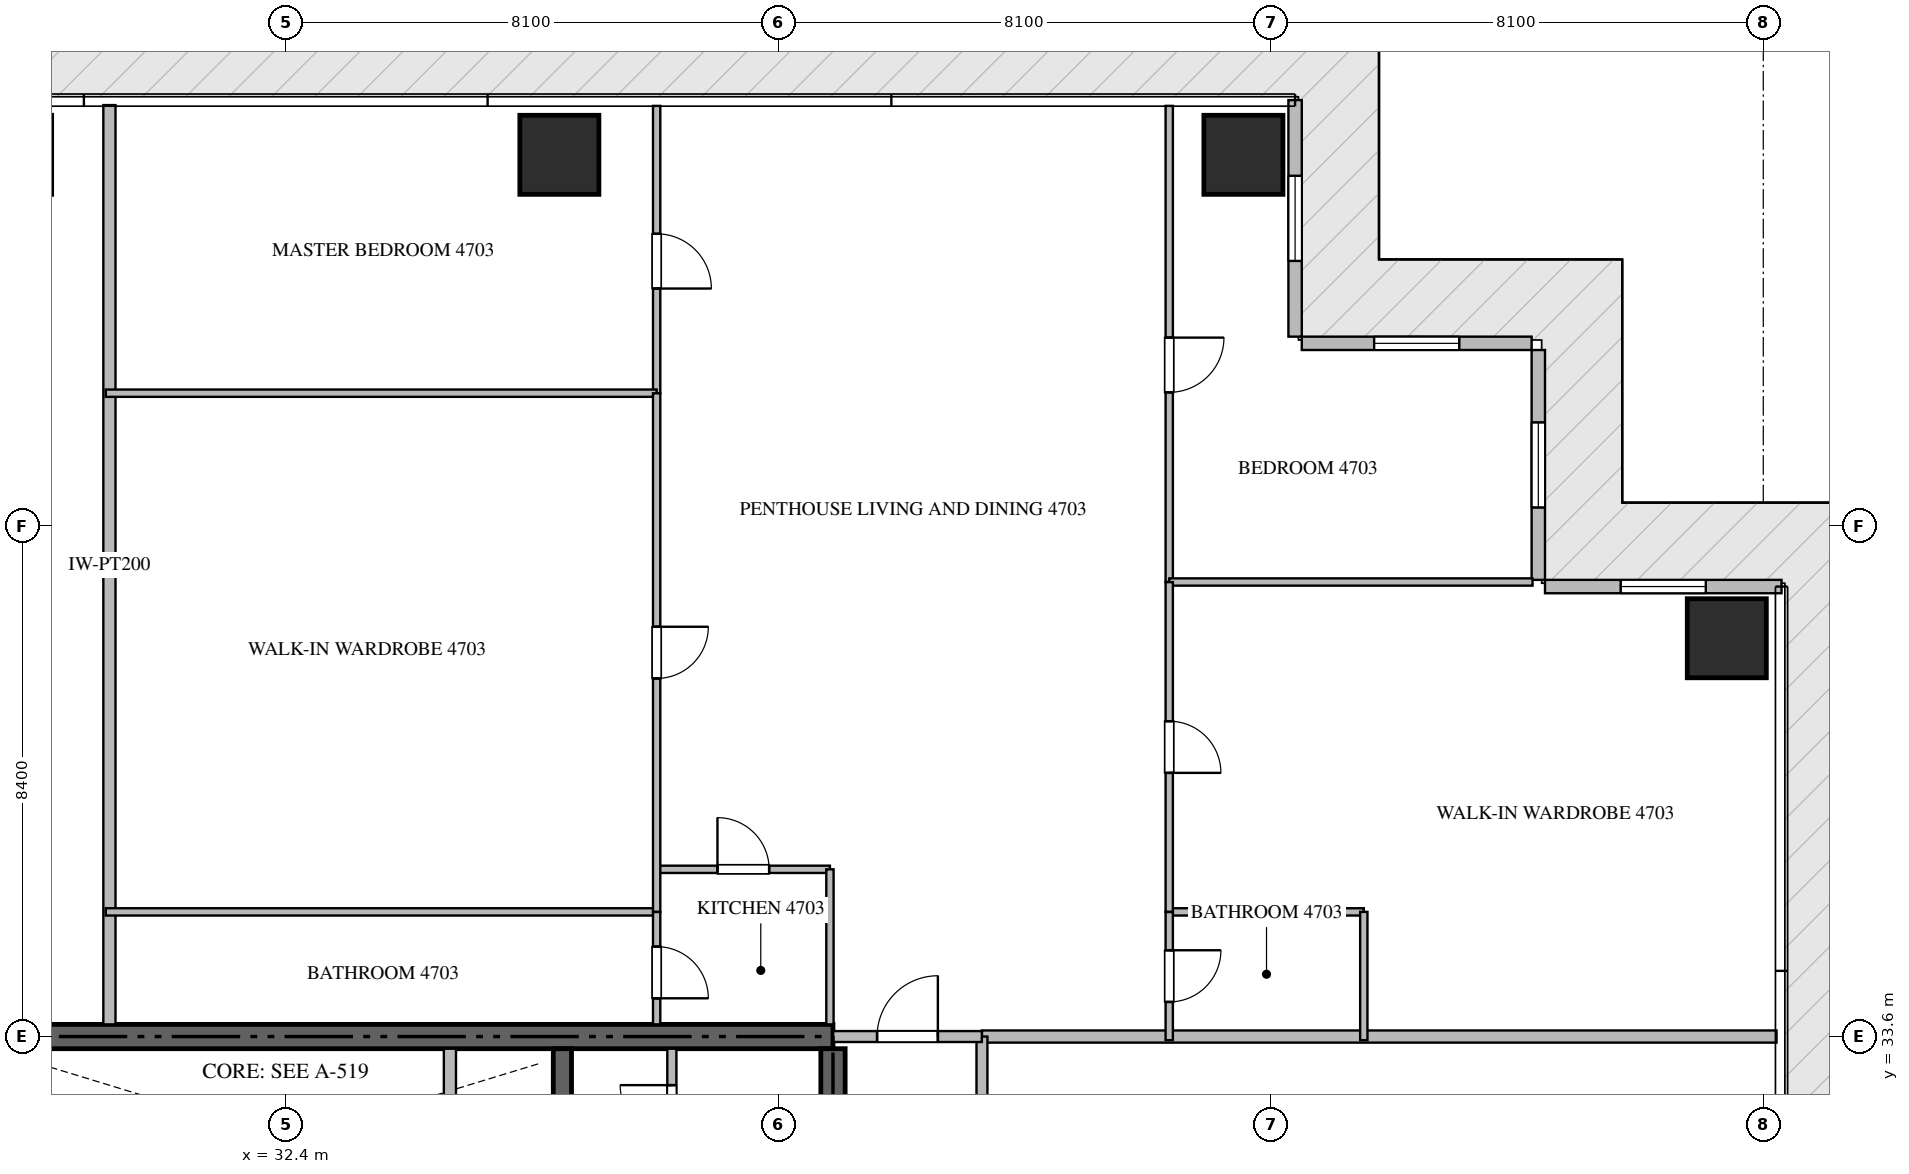
"""IFC4 building model, lengths in metres.
Left out: names, types, materials, properties, quantities, classifications, styles, units other than length and angle.
Written with IfcOpenShell. Run it as: python <this file> out.ifc"""

import sys

from ifc_helpers import new_model, si_unit, direction, frame, frame_2d, origin, origin_2d, place, context, subcontext, project, spatial, rectangle, extrude, source, transform, mapped, element, fill, save


model = new_model("IFC4")
c1 = context("Model", 3, precision=1e-05, world=origin(), true_north=direction((0.0, 1.0)))
c2 = subcontext(c1, "Body", "Model", "MODEL_VIEW")
j1 = project(units=[si_unit("LENGTHUNIT", "METRE"), si_unit("PLANEANGLEUNIT", "RADIAN")], contexts=[c1])
p1 = place(None, origin())
s1 = spatial("IfcSite", under=j1, at=p1, CompositionType="ELEMENT")
p2 = place(p1, origin())
s2 = spatial("IfcBuilding", under=s1, at=p2, CompositionType="ELEMENT")
p3 = place(p2, frame((0.0, 0.0, 187.65)))
s3 = spatial("IfcBuildingStorey", under=s2, at=p3, CompositionType="ELEMENT", Elevation=187.65)
p4 = place(p3, frame((41.4, 33.6, -0.26), z_axis=(0.0, 0.0, 1.0), x_axis=(-1.0, 0.0, 0.0)))
e1 = element("IfcWall", 1, at=p4, inside=s3, PredefinedType="SHEAR", context=c2, shape_type="SweptSolid", body=[
    extrude(rectangle(XDim=18.0, YDim=0.4, at=frame_2d((9.0, 0.0))), origin(), (0.0, 0.0, 1.0), 3.748),
])
p5 = place(p3, frame((41.4, 27.75, -0.26), z_axis=(0.0, 0.0, 1.0), x_axis=(0.0, 1.0, 0.0)))
e2 = element("IfcWall", 2, at=p5, inside=s3, PredefinedType="SHEAR", context=c2, shape_type="SweptSolid", body=[
    extrude(rectangle(XDim=5.65, YDim=0.4, at=frame_2d((2.825, 0.0))), origin(), (0.0, 0.0, 1.0), 3.748),
])
p6 = place(p3, frame((36.95, 27.05, -0.26), z_axis=(0.0, 0.0, 1.0), x_axis=(0.0, 1.0, 0.0)))
e3 = element("IfcWall", 3, at=p6, inside=s3, PredefinedType="SHEAR", context=c2, shape_type="SweptSolid", body=[
    extrude(rectangle(XDim=6.35, YDim=0.3, at=frame_2d((3.175, 0.0))), origin(), (0.0, 0.0, 1.0), 3.748),
])
m1 = source(origin(), c2, "Body", "SweptSolid", [
    extrude(rectangle(XDim=1.3, YDim=1.3, at=origin_2d()), origin(), (0.0, 0.0, 1.0), 3.75),
])
for number, where, z_axis, x_axis in (
    (4, (36.9, 48.1, -0.26), (0.0, 0.0, 1.0), (1.0, 0.0, 0.0)),
    (5, (48.15, 48.1, -0.26), (0.0, 0.0, 1.0), (1.0, 0.0, 0.0)),
    (6, (56.1, 40.15, -0.26), (0.0, 0.0, 1.0), (1.0, 0.0, 0.0)),
):
    element("IfcColumn", number, at=place(p3, frame(where, z_axis=z_axis, x_axis=x_axis)), inside=s3, PredefinedType="COLUMN", context=c2, shape_type="MappedRepresentation", body=[
        mapped(m1, transform((0.0, 0.0, 0.0), scale=1.0)),
    ])
p7 = place(p3, frame((57.0, 41.0, 0.0), z_axis=(0.0, 0.0, 1.0), x_axis=(-1.0, 0.0, 0.0)))
e7 = element("IfcWall", 7, at=p7, inside=s3, PredefinedType="ELEMENTEDWALL", context=c2, shape_type="SweptSolid", body=[
    extrude(rectangle(XDim=3.89, YDim=0.22, at=frame_2d((1.945, 0.0))), origin(), (0.0, 0.0, 1.0), 3.475),
])
p8 = place(p7, frame((1.245, 0.0, 0.65)))
e8 = element("IfcOpeningElement", 8, at=p8, cuts=e7, PredefinedType="OPENING", context=c2, shape_type="SweptSolid", body=[
    extrude(rectangle(XDim=1.4, YDim=2.05, at=frame_2d((0.7, 1.025))), frame((0.0, 0.12, 0.0), z_axis=(0.0, -1.0, 0.0), x_axis=(1.0, 0.0, 0.0)), (0.0, 0.0, 1.0), 0.24),
])
p9 = place(p3, frame((53.0, 41.11, 0.0), z_axis=(0.0, 0.0, 1.0), x_axis=(0.0, 1.0, 0.0)))
e9 = element("IfcWall", 9, at=p9, inside=s3, PredefinedType="ELEMENTEDWALL", context=c2, shape_type="SweptSolid", body=[
    extrude(rectangle(XDim=3.78, YDim=0.22, at=frame_2d((1.89, 0.0))), origin(), (0.0, 0.0, 1.0), 3.475),
])
p10 = place(p9, frame((1.19, 0.0, 0.65)))
e10 = element("IfcOpeningElement", 10, at=p10, cuts=e9, PredefinedType="OPENING", context=c2, shape_type="SweptSolid", body=[
    extrude(rectangle(XDim=1.4, YDim=2.05, at=frame_2d((0.7, 1.025))), frame((0.0, 0.12, 0.0), z_axis=(0.0, -1.0, 0.0), x_axis=(1.0, 0.0, 0.0)), (0.0, 0.0, 1.0), 0.24),
])
p11 = place(p3, frame((52.89, 45.0, 0.0), z_axis=(0.0, 0.0, 1.0), x_axis=(-1.0, 0.0, 0.0)))
e11 = element("IfcWall", 11, at=p11, inside=s3, PredefinedType="ELEMENTEDWALL", context=c2, shape_type="SweptSolid", body=[
    extrude(rectangle(XDim=3.78, YDim=0.22, at=frame_2d((1.89, 0.0))), origin(), (0.0, 0.0, 1.0), 3.475),
])
p12 = place(p11, frame((1.19, 0.0, 0.65)))
e12 = element("IfcOpeningElement", 12, at=p12, cuts=e11, PredefinedType="OPENING", context=c2, shape_type="SweptSolid", body=[
    extrude(rectangle(XDim=1.4, YDim=2.05, at=frame_2d((0.7, 1.025))), frame((0.0, 0.12, 0.0), z_axis=(0.0, -1.0, 0.0), x_axis=(1.0, 0.0, 0.0)), (0.0, 0.0, 1.0), 0.24),
])
p13 = place(p3, frame((49.0, 45.11, 0.0), z_axis=(0.0, 0.0, 1.0), x_axis=(0.0, 1.0, 0.0)))
e13 = element("IfcWall", 13, at=p13, inside=s3, PredefinedType="ELEMENTEDWALL", context=c2, shape_type="SweptSolid", body=[
    extrude(rectangle(XDim=3.89, YDim=0.22, at=frame_2d((1.945, 0.0))), origin(), (0.0, 0.0, 1.0), 3.475),
])
p14 = place(p13, frame((1.245, 0.0, 0.65)))
e14 = element("IfcOpeningElement", 14, at=p14, cuts=e13, PredefinedType="OPENING", context=c2, shape_type="SweptSolid", body=[
    extrude(rectangle(XDim=1.4, YDim=2.05, at=frame_2d((0.7, 1.025))), frame((0.0, 0.12, 0.0), z_axis=(0.0, -1.0, 0.0), x_axis=(1.0, 0.0, 0.0)), (0.0, 0.0, 1.0), 0.24),
])
p15 = place(p3, frame((35.1, 30.75, 0.0), z_axis=(0.0, 0.0, 1.0), x_axis=(0.0, 1.0, 0.0)))
e15 = element("IfcWall", 15, at=p15, inside=s3, PredefinedType="STANDARD", context=c2, shape_type="SweptSolid", body=[
    extrude(rectangle(XDim=2.65, YDim=0.2, at=frame_2d((1.325, 0.0))), origin(), (0.0, 0.0, 1.0), 3.49),
])
p16 = place(p3, frame((38.75, 31.352, 0.0), z_axis=(0.0, 0.0, 1.0), x_axis=(0.0, 1.0, 0.0)))
e16 = element("IfcWall", 16, at=p16, inside=s3, PredefinedType="PARTITIONING", context=c2, shape_type="SweptSolid", body=[
    extrude(rectangle(XDim=2.048, YDim=0.15, at=frame_2d((1.024, 0.0))), origin(), (0.0, 0.0, 1.0), 3.49),
])
p17 = place(p16, frame((0.599, 0.0, 0.0)))
e17 = element("IfcOpeningElement", 17, at=p17, cuts=e16, PredefinedType="OPENING", context=c2, shape_type="SweptSolid", body=[
    extrude(rectangle(XDim=0.85, YDim=2.1, at=frame_2d((0.425, 1.05))), frame((0.0, 0.085, 0.0), z_axis=(0.0, -1.0, 0.0), x_axis=(1.0, 0.0, 0.0)), (0.0, 0.0, 1.0), 0.17),
])
p18 = place(p3, frame((29.5, 33.8, 0.0), z_axis=(0.0, 0.0, 1.0), x_axis=(0.0, 1.0, 0.0)))
e18 = element("IfcWall", 18, at=p18, inside=s3, PredefinedType="PARTITIONING", context=c2, shape_type="SweptSolid", body=[
    extrude(rectangle(XDim=15.118, YDim=0.2, at=frame_2d((7.559, 0.0))), origin(), (0.0, 0.0, 1.0), 3.49),
])
p19 = place(p3, frame((43.85, 33.6, 0.0), z_axis=(0.0, 0.0, 1.0), x_axis=(1.0, 0.0, 0.0)))
e19 = element("IfcWall", 19, at=p19, inside=s3, PredefinedType="PARTITIONING", context=c2, shape_type="SweptSolid", body=[
    extrude(rectangle(XDim=13.068, YDim=0.2, at=frame_2d((6.534, 0.0))), origin(), (0.0, 0.0, 1.0), 3.49),
])
p20 = place(p3, frame((43.85, 14.9, 0.0), z_axis=(0.0, 0.0, 1.0), x_axis=(0.0, 1.0, 0.0)))
e20 = element("IfcWall", 20, at=p20, inside=s3, PredefinedType="PARTITIONING", context=c2, shape_type="SweptSolid", body=[
    extrude(rectangle(XDim=18.7, YDim=0.18, at=frame_2d((9.35, 0.0))), origin(), (0.0, 0.0, 1.0), 3.49),
])
p21 = place(p20, frame((6.708, 0.0, 0.0)))
e21 = element("IfcOpeningElement", 21, at=p21, cuts=e20, PredefinedType="OPENING", context=c2, shape_type="SweptSolid", body=[
    extrude(rectangle(XDim=1.0, YDim=2.15, at=frame_2d((0.5, 1.075))), frame((0.0, 0.1, 0.0), z_axis=(0.0, -1.0, 0.0), x_axis=(1.0, 0.0, 0.0)), (0.0, 0.0, 1.0), 0.2),
])
p22 = place(p20, frame((15.134, 0.0, 0.0)))
e22 = element("IfcOpeningElement", 22, at=p22, cuts=e20, PredefinedType="OPENING", context=c2, shape_type="SweptSolid", body=[
    extrude(rectangle(XDim=1.0, YDim=2.15, at=frame_2d((0.5, 1.075))), frame((0.0, 0.1, 0.0), z_axis=(0.0, -1.0, 0.0), x_axis=(1.0, 0.0, 0.0)), (0.0, 0.0, 1.0), 0.2),
])
p23 = place(p3, frame((41.402, 33.6, 0.0), z_axis=(0.0, 0.0, 1.0), x_axis=(1.0, 0.0, 0.0)))
e23 = element("IfcWall", 23, at=p23, inside=s3, PredefinedType="PARTITIONING", context=c2, shape_type="SweptSolid", body=[
    extrude(rectangle(XDim=2.446, YDim=0.18, at=frame_2d((1.223, 0.0))), origin(), (0.0, 0.0, 1.0), 3.49),
])
p24 = place(p23, frame((0.723, 0.0, 0.0)))
e24 = element("IfcOpeningElement", 24, at=p24, cuts=e23, PredefinedType="OPENING", context=c2, shape_type="SweptSolid", body=[
    extrude(rectangle(XDim=1.0, YDim=2.15, at=frame_2d((0.5, 1.075))), frame((0.0, 0.1, 0.0), z_axis=(0.0, -1.0, 0.0), x_axis=(1.0, 0.0, 0.0)), (0.0, 0.0, 1.0), 0.2),
])
p25 = place(p3, frame((38.5, 36.35, 0.0), z_axis=(0.0, 0.0, 1.0), x_axis=(1.0, 0.0, 0.0)))
e25 = element("IfcWall", 25, at=p25, inside=s3, PredefinedType="PARTITIONING", context=c2, shape_type="SweptSolid", body=[
    extrude(rectangle(XDim=2.85, YDim=0.12, at=frame_2d((1.425, 0.0))), origin(), (0.0, 0.0, 1.0), 3.49),
])
p26 = place(p25, frame((1.0, 0.0, 0.0)))
e26 = element("IfcOpeningElement", 26, at=p26, cuts=e25, PredefinedType="OPENING", context=c2, shape_type="SweptSolid", body=[
    extrude(rectangle(XDim=0.85, YDim=2.1, at=frame_2d((0.425, 1.05))), frame((0.0, 0.07, 0.0), z_axis=(0.0, -1.0, 0.0), x_axis=(1.0, 0.0, 0.0)), (0.0, 0.0, 1.0), 0.14),
])
p27 = place(p3, frame((41.35, 36.35, 0.0), z_axis=(0.0, 0.0, 1.0), x_axis=(0.0, -1.0, 0.0)))
e27 = element("IfcWall", 27, at=p27, inside=s3, PredefinedType="PARTITIONING", context=c2, shape_type="SweptSolid", body=[
    extrude(rectangle(XDim=2.55, YDim=0.12, at=frame_2d((1.275, 0.0))), origin(), (0.0, 0.0, 1.0), 3.49),
])
p28 = place(p3, frame((38.5, 48.905, 0.0), z_axis=(0.0, 0.0, 1.0), x_axis=(0.0, -1.0, 0.0)))
e28 = element("IfcWall", 28, at=p28, inside=s3, PredefinedType="PARTITIONING", context=c2, shape_type="SweptSolid", body=[
    extrude(rectangle(XDim=4.725, YDim=0.12, at=frame_2d((2.363, 0.0))), origin(), (0.0, 0.0, 1.0), 3.49),
])
p29 = place(p28, frame((2.104, 0.0, 0.0)))
e29 = element("IfcOpeningElement", 29, at=p29, cuts=e28, PredefinedType="OPENING", context=c2, shape_type="SweptSolid", body=[
    extrude(rectangle(XDim=0.9, YDim=2.1, at=frame_2d((0.45, 1.05))), frame((0.0, 0.07, 0.0), z_axis=(0.0, -1.0, 0.0), x_axis=(1.0, 0.0, 0.0)), (0.0, 0.0, 1.0), 0.14),
])
for number, where, z_axis, x_axis in (
    (30, (29.44, 44.18, 0.0), (0.0, 0.0, 1.0), (1.0, 0.0, 0.0)),
    (31, (29.44, 35.65, 0.0), (0.0, 0.0, 1.0), (1.0, 0.0, 0.0)),
):
    element("IfcWall", number, at=place(p3, frame(where, z_axis=z_axis, x_axis=x_axis)), inside=s3, PredefinedType="PARTITIONING", context=c2, shape_type="SweptSolid", body=[
        extrude(rectangle(XDim=9.06, YDim=0.12, at=frame_2d((4.53, 0.0))), origin(), (0.0, 0.0, 1.0), 3.49),
    ])
p30 = place(p3, frame((38.5, 44.178, 0.0), z_axis=(0.0, 0.0, 1.0), x_axis=(0.0, -1.0, 0.0)))
e32 = element("IfcWall", 32, at=p30, inside=s3, PredefinedType="PARTITIONING", context=c2, shape_type="SweptSolid", body=[
    extrude(rectangle(XDim=8.528, YDim=0.12, at=frame_2d((4.264, 0.0))), origin(), (0.0, 0.0, 1.0), 3.49),
])
p31 = place(p30, frame((3.839, 0.0, 0.0)))
e33 = element("IfcOpeningElement", 33, at=p31, cuts=e32, PredefinedType="OPENING", context=c2, shape_type="SweptSolid", body=[
    extrude(rectangle(XDim=0.85, YDim=2.1, at=frame_2d((0.425, 1.05))), frame((0.0, 0.07, 0.0), z_axis=(0.0, -1.0, 0.0), x_axis=(1.0, 0.0, 0.0)), (0.0, 0.0, 1.0), 0.14),
])
p32 = place(p3, frame((38.5, 35.648, 0.0), z_axis=(0.0, 0.0, 1.0), x_axis=(0.0, -1.0, 0.0)))
e34 = element("IfcWall", 34, at=p32, inside=s3, PredefinedType="PARTITIONING", context=c2, shape_type="SweptSolid", body=[
    extrude(rectangle(XDim=1.848, YDim=0.12, at=frame_2d((0.924, 0.0))), origin(), (0.0, 0.0, 1.0), 3.49),
])
p33 = place(p32, frame((0.569, 0.0, 0.0)))
e35 = element("IfcOpeningElement", 35, at=p33, cuts=e34, PredefinedType="OPENING", context=c2, shape_type="SweptSolid", body=[
    extrude(rectangle(XDim=0.85, YDim=2.1, at=frame_2d((0.425, 1.05))), frame((0.0, 0.07, 0.0), z_axis=(0.0, -1.0, 0.0), x_axis=(1.0, 0.0, 0.0)), (0.0, 0.0, 1.0), 0.14),
])
p34 = place(p3, frame((46.93, 48.905, 0.0), z_axis=(0.0, 0.0, 1.0), x_axis=(0.0, -1.0, 0.0)))
e36 = element("IfcWall", 36, at=p34, inside=s3, PredefinedType="PARTITIONING", context=c2, shape_type="SweptSolid", body=[
    extrude(rectangle(XDim=7.83, YDim=0.12, at=frame_2d((3.915, 0.0))), origin(), (0.0, 0.0, 1.0), 3.49),
])
p35 = place(p34, frame((3.811, 0.0, 0.0)))
e37 = element("IfcOpeningElement", 37, at=p35, cuts=e36, PredefinedType="OPENING", context=c2, shape_type="SweptSolid", body=[
    extrude(rectangle(XDim=0.9, YDim=2.1, at=frame_2d((0.45, 1.05))), frame((0.0, 0.07, 0.0), z_axis=(0.0, -1.0, 0.0), x_axis=(1.0, 0.0, 0.0)), (0.0, 0.0, 1.0), 0.14),
])
p36 = place(p3, frame((46.93, 41.075, 0.0), z_axis=(0.0, 0.0, 1.0), x_axis=(1.0, 0.0, 0.0)))
e38 = element("IfcWall", 38, at=p36, inside=s3, PredefinedType="PARTITIONING", context=c2, shape_type="SweptSolid", body=[
    extrude(rectangle(XDim=5.975, YDim=0.12, at=frame_2d((2.988, 0.0))), origin(), (0.0, 0.0, 1.0), 3.49),
])
p37 = place(p3, frame((46.93, 35.65, 0.0), z_axis=(0.0, 0.0, 1.0), x_axis=(1.0, 0.0, 0.0)))
e39 = element("IfcWall", 39, at=p37, inside=s3, PredefinedType="PARTITIONING", context=c2, shape_type="SweptSolid", body=[
    extrude(rectangle(XDim=3.2, YDim=0.12, at=frame_2d((1.6, 0.0))), origin(), (0.0, 0.0, 1.0), 3.49),
])
p38 = place(p3, frame((50.13, 35.65, 0.0), z_axis=(0.0, 0.0, 1.0), x_axis=(0.0, -1.0, 0.0)))
e40 = element("IfcWall", 40, at=p38, inside=s3, PredefinedType="PARTITIONING", context=c2, shape_type="SweptSolid", body=[
    extrude(rectangle(XDim=2.11, YDim=0.12, at=frame_2d((1.055, 0.0))), origin(), (0.0, 0.0, 1.0), 3.49),
])
p39 = place(p3, frame((46.93, 41.073, 0.0), z_axis=(0.0, 0.0, 1.0), x_axis=(0.0, -1.0, 0.0)))
e41 = element("IfcWall", 41, at=p39, inside=s3, PredefinedType="PARTITIONING", context=c2, shape_type="SweptSolid", body=[
    extrude(rectangle(XDim=5.423, YDim=0.12, at=frame_2d((2.711, 0.0))), origin(), (0.0, 0.0, 1.0), 3.49),
])
p40 = place(p39, frame((2.287, 0.0, 0.0)))
e42 = element("IfcOpeningElement", 42, at=p40, cuts=e41, PredefinedType="OPENING", context=c2, shape_type="SweptSolid", body=[
    extrude(rectangle(XDim=0.85, YDim=2.1, at=frame_2d((0.425, 1.05))), frame((0.0, 0.07, 0.0), z_axis=(0.0, -1.0, 0.0), x_axis=(1.0, 0.0, 0.0)), (0.0, 0.0, 1.0), 0.14),
])
p41 = place(p3, frame((46.93, 35.648, 0.0), z_axis=(0.0, 0.0, 1.0), x_axis=(0.0, -1.0, 0.0)))
e43 = element("IfcWall", 43, at=p41, inside=s3, PredefinedType="PARTITIONING", context=c2, shape_type="SweptSolid", body=[
    extrude(rectangle(XDim=2.108, YDim=0.12, at=frame_2d((1.054, 0.0))), origin(), (0.0, 0.0, 1.0), 3.49),
])
p42 = place(p41, frame((0.629, 0.0, 0.0)))
e44 = element("IfcOpeningElement", 44, at=p42, cuts=e43, PredefinedType="OPENING", context=c2, shape_type="SweptSolid", body=[
    extrude(rectangle(XDim=0.85, YDim=2.1, at=frame_2d((0.425, 1.05))), frame((0.0, 0.07, 0.0), z_axis=(0.0, -1.0, 0.0), x_axis=(1.0, 0.0, 0.0)), (0.0, 0.0, 1.0), 0.14),
])
m2 = source(origin(), c2, "Body", "SweptSolid", [
    extrude(rectangle(XDim=1.4, YDim=2.05, at=frame_2d((0.7, 1.025))), frame((0.0, 0.03, 0.0), z_axis=(0.0, -1.0, 0.0), x_axis=(1.0, 0.0, 0.0)), (0.0, 0.0, 1.0), 0.06),
])
p43 = place(p8, origin())
e45 = element("IfcWindow", 45, at=p43, inside=s3, PartitioningType="SINGLE_PANEL", PredefinedType="WINDOW", context=c2, shape_type="MappedRepresentation", body=[
    mapped(m2, transform((0.0, 0.0, 0.0), scale=1.0)),
])
fill(e8, e45)
p44 = place(p10, origin())
e46 = element("IfcWindow", 46, at=p44, inside=s3, PartitioningType="SINGLE_PANEL", PredefinedType="WINDOW", context=c2, shape_type="MappedRepresentation", body=[
    mapped(m2, transform((0.0, 0.0, 0.0), scale=1.0)),
])
fill(e10, e46)
p45 = place(p12, origin())
e47 = element("IfcWindow", 47, at=p45, inside=s3, PartitioningType="SINGLE_PANEL", PredefinedType="WINDOW", context=c2, shape_type="MappedRepresentation", body=[
    mapped(m2, transform((0.0, 0.0, 0.0), scale=1.0)),
])
fill(e12, e47)
p46 = place(p14, origin())
e48 = element("IfcWindow", 48, at=p46, inside=s3, PartitioningType="SINGLE_PANEL", PredefinedType="WINDOW", context=c2, shape_type="MappedRepresentation", body=[
    mapped(m2, transform((0.0, 0.0, 0.0), scale=1.0)),
])
fill(e14, e48)
m3 = source(origin(), c2, "Body", "SweptSolid", [
    extrude(rectangle(XDim=0.85, YDim=2.1, at=frame_2d((0.425, 1.05))), frame((0.0, 0.025, 0.0), z_axis=(0.0, -1.0, 0.0), x_axis=(1.0, 0.0, 0.0)), (0.0, 0.0, 1.0), 0.05),
])
p47 = place(p17, origin())
e49 = element("IfcDoor", 49, at=p47, inside=s3, OperationType="SINGLE_SWING_RIGHT", PredefinedType="DOOR", context=c2, shape_type="MappedRepresentation", body=[
    mapped(m3, transform((0.0, 0.0, 0.0), scale=1.0)),
])
fill(e17, e49)
m4 = source(origin(), c2, "Body", "SweptSolid", [
    extrude(rectangle(XDim=1.0, YDim=2.15, at=frame_2d((0.5, 1.075))), frame((0.0, 0.025, 0.0), z_axis=(0.0, -1.0, 0.0), x_axis=(1.0, 0.0, 0.0)), (0.0, 0.0, 1.0), 0.05),
])
p48 = place(p24, origin())
e50 = element("IfcDoor", 50, at=p48, inside=s3, OperationType="SINGLE_SWING_RIGHT", PredefinedType="DOOR", context=c2, shape_type="MappedRepresentation", body=[
    mapped(m4, transform((0.0, 0.0, 0.0), scale=1.0)),
])
fill(e24, e50)
p49 = place(p26, origin())
e51 = element("IfcDoor", 51, at=p49, inside=s3, OperationType="SINGLE_SWING_LEFT", PredefinedType="DOOR", context=c2, shape_type="MappedRepresentation", body=[
    mapped(m3, transform((0.0, 0.0, 0.0), scale=1.0)),
])
fill(e26, e51)
m5 = source(origin(), c2, "Body", "SweptSolid", [
    extrude(rectangle(XDim=0.9, YDim=2.1, at=frame_2d((0.45, 1.05))), frame((0.0, 0.025, 0.0), z_axis=(0.0, -1.0, 0.0), x_axis=(1.0, 0.0, 0.0)), (0.0, 0.0, 1.0), 0.05),
])
p50 = place(p29, origin())
e52 = element("IfcDoor", 52, at=p50, inside=s3, OperationType="SINGLE_SWING_RIGHT", PredefinedType="DOOR", context=c2, shape_type="MappedRepresentation", body=[
    mapped(m5, transform((0.0, 0.0, 0.0), scale=1.0)),
])
fill(e29, e52)
p51 = place(p31, origin())
e53 = element("IfcDoor", 53, at=p51, inside=s3, OperationType="SINGLE_SWING_LEFT", PredefinedType="DOOR", context=c2, shape_type="MappedRepresentation", body=[
    mapped(m3, transform((0.0, 0.0, 0.0), scale=1.0)),
])
fill(e33, e53)
p52 = place(p33, origin())
e54 = element("IfcDoor", 54, at=p52, inside=s3, OperationType="SINGLE_SWING_RIGHT", PredefinedType="DOOR", context=c2, shape_type="MappedRepresentation", body=[
    mapped(m3, transform((0.0, 0.0, 0.0), scale=1.0)),
])
fill(e35, e54)
p53 = place(p35, origin())
e55 = element("IfcDoor", 55, at=p53, inside=s3, OperationType="SINGLE_SWING_LEFT", PredefinedType="DOOR", context=c2, shape_type="MappedRepresentation", body=[
    mapped(m5, transform((0.0, 0.0, 0.0), scale=1.0)),
])
fill(e37, e55)
p54 = place(p40, origin())
e56 = element("IfcDoor", 56, at=p54, inside=s3, OperationType="SINGLE_SWING_RIGHT", PredefinedType="DOOR", context=c2, shape_type="MappedRepresentation", body=[
    mapped(m3, transform((0.0, 0.0, 0.0), scale=1.0)),
])
fill(e42, e56)
p55 = place(p42, origin())
e57 = element("IfcDoor", 57, at=p55, inside=s3, OperationType="SINGLE_SWING_LEFT", PredefinedType="DOOR", context=c2, shape_type="MappedRepresentation", body=[
    mapped(m3, transform((0.0, 0.0, 0.0), scale=1.0)),
])
fill(e44, e57)
save(model, sys.argv[1])
